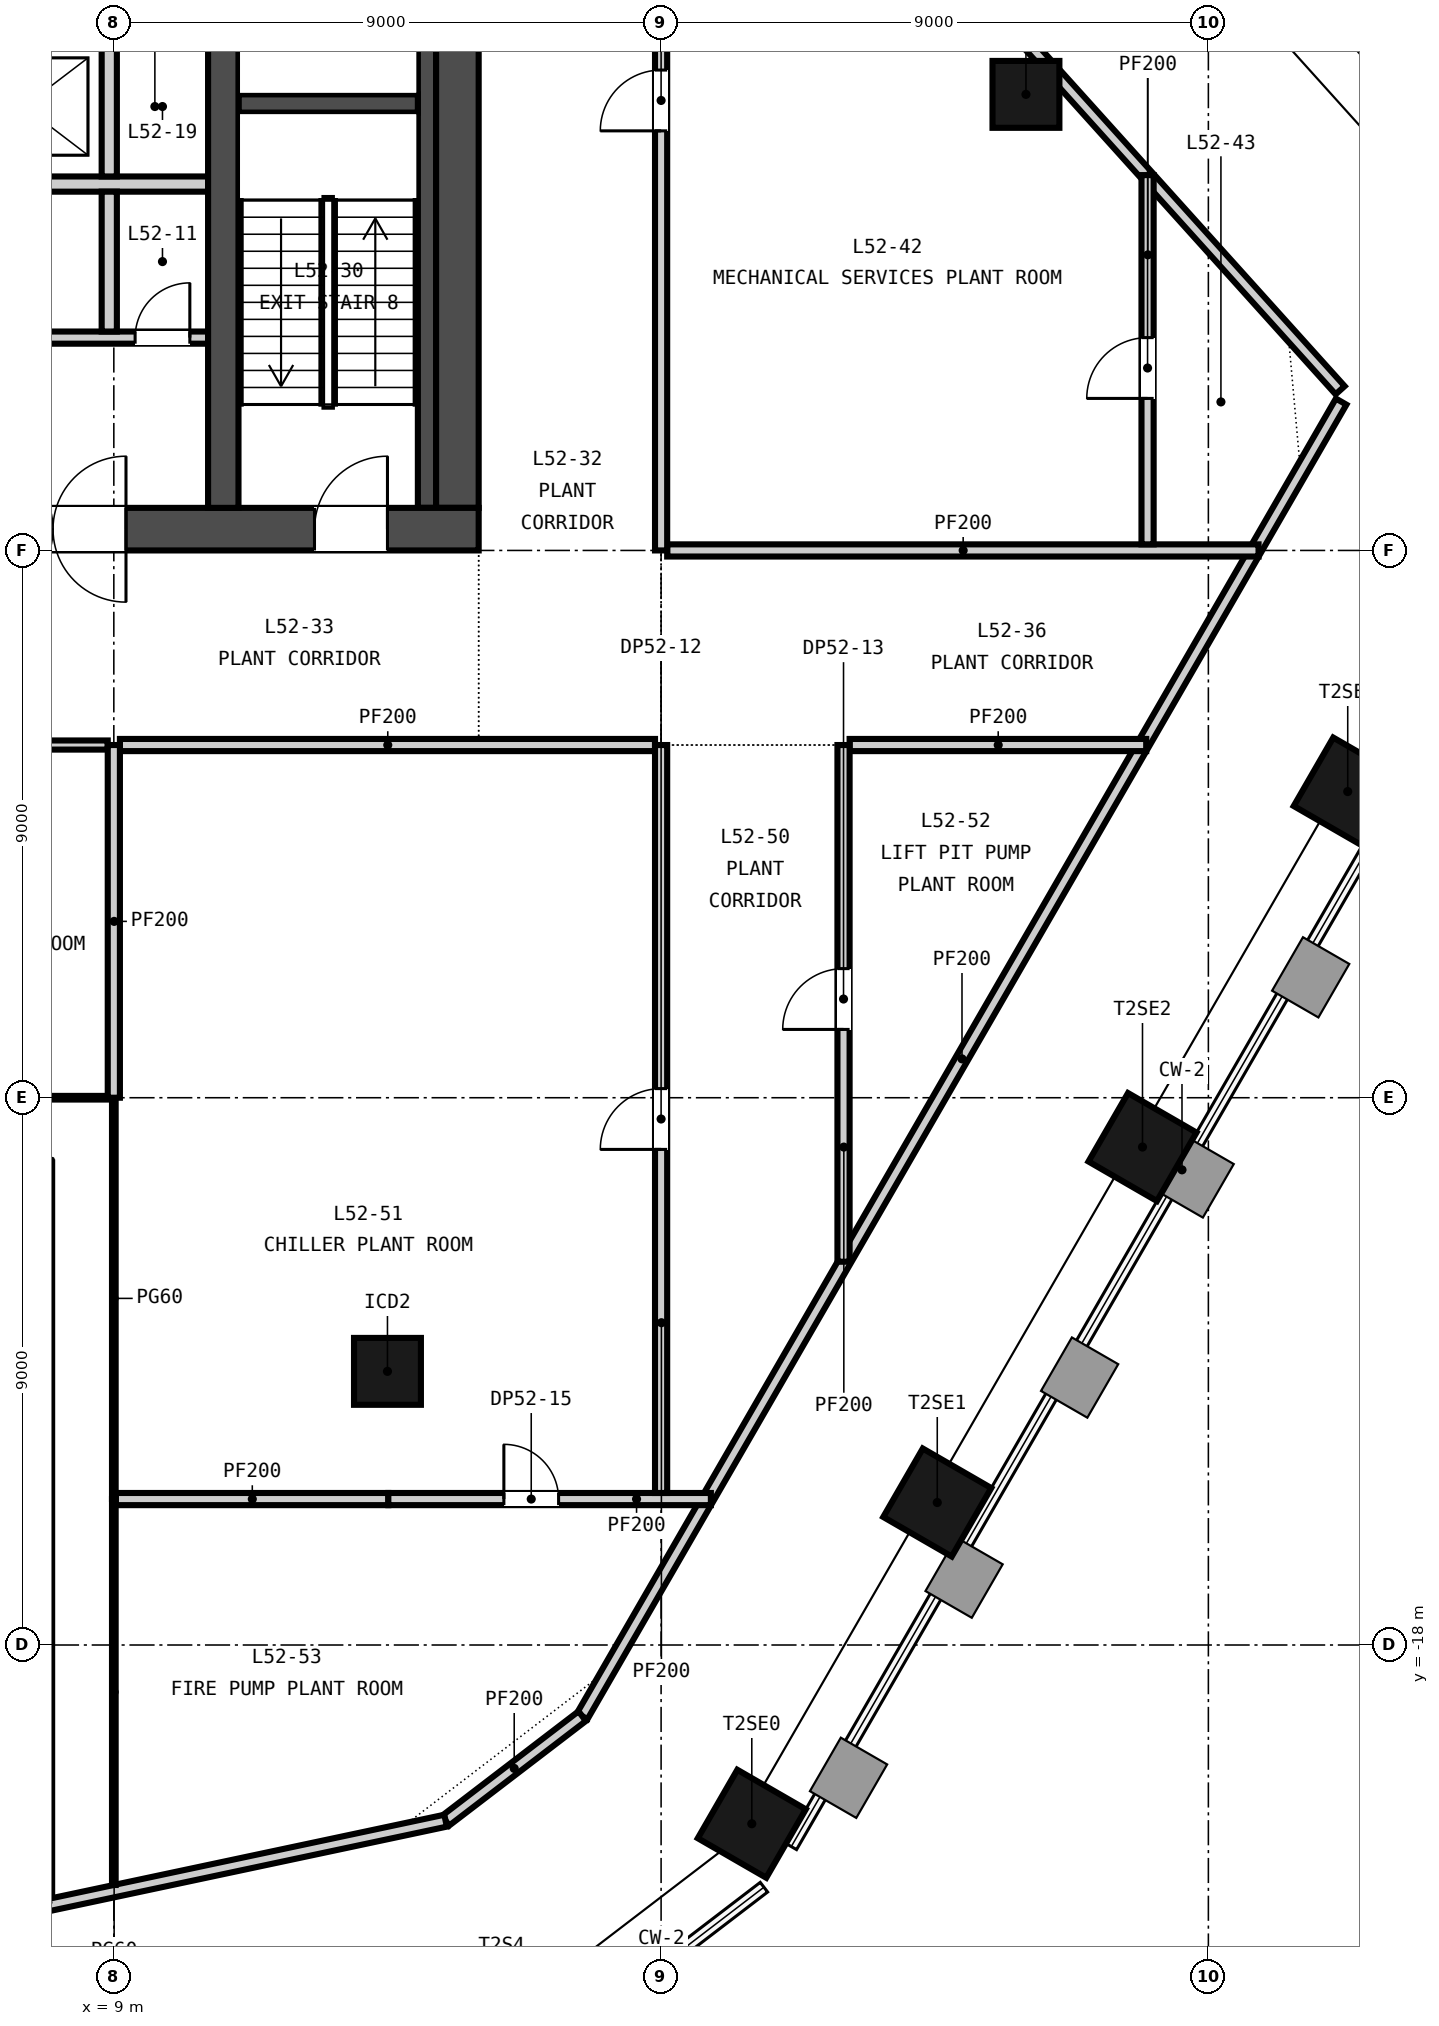
"""IFC4 building model, lengths in metres.
Left out: names, types, materials, properties, quantities, classifications, styles, units other than length and angle.
Written with IfcOpenShell. Run it as: python <this file> out.ifc"""

import sys

from ifc_helpers import new_model, si_unit, direction, frame, frame_2d, origin, origin_2d, place, context, subcontext, project, spatial, rectangle, extrude, element, fill, save


model = new_model("IFC4")
c1 = context("Model", 3, precision=1e-05, world=origin(), true_north=direction((0.0, 1.0)))
c2 = subcontext(c1, "Body", "Model", "MODEL_VIEW")
j1 = project(units=[si_unit("LENGTHUNIT", "METRE"), si_unit("PLANEANGLEUNIT", "RADIAN")], contexts=[c1])
p1 = place(None, origin())
s1 = spatial("IfcSite", under=j1, at=p1, CompositionType="ELEMENT")
p2 = place(p1, origin())
s2 = spatial("IfcBuilding", under=s1, at=p2, CompositionType="ELEMENT")
p3 = place(p2, frame((0.0, 0.0, 207.3)))
s3 = spatial("IfcBuildingStorey", under=s2, at=p3, CompositionType="ELEMENT", Elevation=207.3)
p4 = place(p3, frame((-15.0, 0.35, -0.3), z_axis=(0.0, 0.0, 1.0), x_axis=(1.0, 0.0, 0.0)))
e1 = element("IfcWall", 1, at=p4, inside=s3, PredefinedType="SOLIDWALL", context=c2, shape_type="SweptSolid", body=[
    extrude(rectangle(XDim=30.0, YDim=0.7, at=frame_2d((15.0, 0.0))), origin(), (0.0, 0.0, 1.0), 4.5),
])
p5 = place(p4, frame((5.8, 0.0, 0.3)))
e2 = element("IfcOpeningElement", 2, at=p5, cuts=e1, PredefinedType="OPENING", context=c2, shape_type="SweptSolid", body=[
    extrude(rectangle(XDim=2.4, YDim=2.4, at=frame_2d((1.2, 1.2))), frame((0.0, 0.36, 0.0), z_axis=(0.0, -1.0, 0.0), x_axis=(1.0, 0.0, 0.0)), (0.0, 0.0, 1.0), 0.72),
])
p6 = place(p4, frame((13.8, 0.0, 0.3)))
e3 = element("IfcOpeningElement", 3, at=p6, cuts=e1, PredefinedType="OPENING", context=c2, shape_type="SweptSolid", body=[
    extrude(rectangle(XDim=2.4, YDim=2.4, at=frame_2d((1.2, 1.2))), frame((0.0, 0.36, 0.0), z_axis=(0.0, -1.0, 0.0), x_axis=(1.0, 0.0, 0.0)), (0.0, 0.0, 1.0), 0.72),
])
p7 = place(p4, frame((21.8, 0.0, 0.3)))
e4 = element("IfcOpeningElement", 4, at=p7, cuts=e1, PredefinedType="OPENING", context=c2, shape_type="SweptSolid", body=[
    extrude(rectangle(XDim=2.4, YDim=2.4, at=frame_2d((1.2, 1.2))), frame((0.0, 0.36, 0.0), z_axis=(0.0, -1.0, 0.0), x_axis=(1.0, 0.0, 0.0)), (0.0, 0.0, 1.0), 0.72),
])
p8 = place(p4, frame((1.5, 0.0, 0.3)))
e5 = element("IfcOpeningElement", 5, at=p8, cuts=e1, PredefinedType="OPENING", context=c2, shape_type="SweptSolid", body=[
    extrude(rectangle(XDim=1.2, YDim=2.1, at=frame_2d((0.6, 1.05))), frame((0.0, 0.36, 0.0), z_axis=(0.0, -1.0, 0.0), x_axis=(1.0, 0.0, 0.0)), (0.0, 0.0, 1.0), 0.72),
])
p9 = place(p4, frame((27.3, 0.0, 0.3)))
e6 = element("IfcOpeningElement", 6, at=p9, cuts=e1, PredefinedType="OPENING", context=c2, shape_type="SweptSolid", body=[
    extrude(rectangle(XDim=1.2, YDim=2.1, at=frame_2d((0.6, 1.05))), frame((0.0, 0.36, 0.0), z_axis=(0.0, -1.0, 0.0), x_axis=(1.0, 0.0, 0.0)), (0.0, 0.0, 1.0), 0.72),
])
p10 = place(p3, frame((14.65, 0.7, -0.3), z_axis=(0.0, 0.0, 1.0), x_axis=(0.0, 1.0, 0.0)))
e7 = element("IfcWall", 7, at=p10, inside=s3, PredefinedType="SOLIDWALL", context=c2, shape_type="SweptSolid", body=[
    extrude(rectangle(XDim=13.6, YDim=0.7, at=frame_2d((6.8, 0.0))), origin(), (0.0, 0.0, 1.0), 4.5),
])
p11 = place(p3, frame((10.8, 0.7, -0.3), z_axis=(0.0, 0.0, 1.0), x_axis=(0.0, 1.0, 0.0)))
e8 = element("IfcWall", 8, at=p11, inside=s3, PredefinedType="SOLIDWALL", context=c2, shape_type="SweptSolid", body=[
    extrude(rectangle(XDim=13.6, YDim=0.5, at=frame_2d((6.8, 0.0))), origin(), (0.0, 0.0, 1.0), 4.5),
])
for number, where, z_axis, x_axis in (
    (9, (19.491, -20.94, -0.3), (0.0, 0.0, 1.0), (0.5, 0.866, 0.0)),
    (10, (22.542, -15.657, -0.3), (0.0, 0.0, 1.0), (0.5, 0.866, 0.0)),
    (11, (25.917, -9.811, -0.3), (0.0, 0.0, 1.0), (0.5, 0.866, 0.0)),
    (12, (29.292, -3.965, -0.3), (0.0, 0.0, 1.0), (0.5, 0.866, 0.0)),
):
    element("IfcColumn", number, at=place(p3, frame(where, z_axis=z_axis, x_axis=x_axis)), inside=s3, PredefinedType="COLUMN", context=c2, shape_type="SweptSolid", body=[
        extrude(rectangle(XDim=1.3, YDim=1.3, at=origin_2d()), origin(), (0.0, 0.0, 1.0), 4.5),
    ])
for number, where, z_axis, x_axis in (
    (13, (13.5, -13.5, -0.3), (0.0, 0.0, 1.0), (1.0, 0.0, 0.0)),
    (14, (24.0, 7.5, -0.3), (0.0, 0.0, 1.0), (1.0, 0.0, 0.0)),
):
    element("IfcColumn", number, at=place(p3, frame(where, z_axis=z_axis, x_axis=x_axis)), inside=s3, PredefinedType="COLUMN", context=c2, shape_type="SweptSolid", body=[
        extrude(rectangle(XDim=1.1, YDim=1.1, at=origin_2d()), origin(), (0.0, 0.0, 1.0), 4.5),
    ])
p12 = place(p3, frame((-10.55, 3.5, 0.0), z_axis=(0.0, 0.0, 1.0), x_axis=(1.0, 0.0, 0.0)))
e15 = element("IfcWall", 15, at=p12, inside=s3, PredefinedType="PARTITIONING", context=c2, shape_type="SweptSolid", body=[
    extrude(rectangle(XDim=21.1, YDim=0.2, at=frame_2d((10.55, 0.0))), origin(), (0.0, 0.0, 1.0), 4.2),
])
p13 = place(p12, frame((19.9, 0.0, 0.0)))
e16 = element("IfcOpeningElement", 16, at=p13, cuts=e15, PredefinedType="OPENING", context=c2, shape_type="SweptSolid", body=[
    extrude(rectangle(XDim=0.9, YDim=2.1, at=frame_2d((0.45, 1.05))), frame((0.0, 0.11, 0.0), z_axis=(0.0, -1.0, 0.0), x_axis=(1.0, 0.0, 0.0)), (0.0, 0.0, 1.0), 0.22),
])
p14 = place(p3, frame((-10.55, 6.025, 0.0), z_axis=(0.0, 0.0, 1.0), x_axis=(1.0, 0.0, 0.0)))
e17 = element("IfcWall", 17, at=p14, inside=s3, PredefinedType="PARTITIONING", context=c2, shape_type="SweptSolid", body=[
    extrude(rectangle(XDim=21.1, YDim=0.25, at=frame_2d((10.55, 0.0))), origin(), (0.0, 0.0, 1.0), 4.2),
])
p15 = place(p3, frame((8.925, 3.6, 0.0), z_axis=(0.0, 0.0, 1.0), x_axis=(0.0, 1.0, 0.0)))
e18 = element("IfcWall", 18, at=p15, inside=s3, PredefinedType="PARTITIONING", context=c2, shape_type="SweptSolid", body=[
    extrude(rectangle(XDim=2.3, YDim=0.25, at=frame_2d((1.15, 0.0))), origin(), (0.0, 0.0, 1.0), 4.2),
])
p16 = place(p3, frame((8.925, 6.15, 0.0), z_axis=(0.0, 0.0, 1.0), x_axis=(0.0, 1.0, 0.0)))
e19 = element("IfcWall", 19, at=p16, inside=s3, PredefinedType="PARTITIONING", context=c2, shape_type="SweptSolid", body=[
    extrude(rectangle(XDim=2.3, YDim=0.25, at=frame_2d((1.15, 0.0))), origin(), (0.0, 0.0, 1.0), 4.2),
])
p17 = place(p3, frame((11.05, 7.35, 0.0), z_axis=(0.0, 0.0, 1.0), x_axis=(1.0, 0.0, 0.0)))
e20 = element("IfcWall", 20, at=p17, inside=s3, PredefinedType="SOLIDWALL", context=c2, shape_type="SweptSolid", body=[
    extrude(rectangle(XDim=2.95, YDim=0.3, at=frame_2d((1.475, 0.0))), origin(), (0.0, 0.0, 1.0), 4.2),
])
p18 = place(p3, frame((14.15, 0.7, 0.0), z_axis=(0.0, 0.0, 1.0), x_axis=(0.0, 1.0, 0.0)))
e21 = element("IfcWall", 21, at=p18, inside=s3, PredefinedType="SOLIDWALL", context=c2, shape_type="SweptSolid", body=[
    extrude(rectangle(XDim=13.6, YDim=0.3, at=frame_2d((6.8, 0.0))), origin(), (0.0, 0.0, 1.0), 4.2),
])
p19 = place(p3, frame((9.03, -15.6, 0.0), z_axis=(0.0, 0.0, 1.0), x_axis=(1.0, 0.0, 0.0)))
e22 = element("IfcWall", 22, at=p19, inside=s3, PredefinedType="PARTITIONING", context=c2, shape_type="SweptSolid", body=[
    extrude(rectangle(XDim=4.484, YDim=0.2, at=frame_2d((2.242, 0.0))), origin(), (0.0, 0.0, 1.0), 4.2),
])
p20 = place(p3, frame((13.514, -15.6, 0.0), z_axis=(0.0, 0.0, 1.0), x_axis=(1.0, 0.0, 0.0)))
e23 = element("IfcWall", 23, at=p20, inside=s3, PredefinedType="PARTITIONING", context=c2, shape_type="SweptSolid", body=[
    extrude(rectangle(XDim=5.304, YDim=0.2, at=frame_2d((2.652, 0.0))), origin(), (0.0, 0.0, 1.0), 3.749),
])
p21 = place(p20, frame((1.9, 0.0, 0.0)))
e24 = element("IfcOpeningElement", 24, at=p21, cuts=e23, PredefinedType="OPENING", context=c2, shape_type="SweptSolid", body=[
    extrude(rectangle(XDim=0.9, YDim=2.1, at=frame_2d((0.45, 1.05))), frame((0.0, 0.11, 0.0), z_axis=(0.0, -1.0, 0.0), x_axis=(1.0, 0.0, 0.0)), (0.0, 0.0, 1.0), 0.22),
])
p22 = place(p3, frame((-0.9, -9.0, 0.0), z_axis=(0.0, 0.0, 1.0), x_axis=(1.0, 0.0, 0.0)))
e25 = element("IfcWall", 25, at=p22, inside=s3, PredefinedType="PARTITIONING", context=c2, shape_type="SweptSolid", body=[
    extrude(rectangle(XDim=9.8, YDim=0.06, at=frame_2d((4.9, 0.0))), origin(), (0.0, 0.0, 1.0), 4.2),
])
p23 = place(p3, frame((-0.9, -3.2, 0.0), z_axis=(0.0, 0.0, 1.0), x_axis=(1.0, 0.0, 0.0)))
e26 = element("IfcWall", 26, at=p23, inside=s3, PredefinedType="PARTITIONING", context=c2, shape_type="SweptSolid", body=[
    extrude(rectangle(XDim=9.8, YDim=0.15, at=frame_2d((4.9, 0.0))), origin(), (0.0, 0.0, 1.0), 4.2),
])
p24 = place(p23, frame((4.4, 0.0, 0.0)))
e27 = element("IfcOpeningElement", 27, at=p24, cuts=e26, PredefinedType="OPENING", context=c2, shape_type="SweptSolid", body=[
    extrude(rectangle(XDim=1.0, YDim=2.1, at=frame_2d((0.5, 1.05))), frame((0.0, 0.085, 0.0), z_axis=(0.0, -1.0, 0.0), x_axis=(1.0, 0.0, 0.0)), (0.0, 0.0, 1.0), 0.17),
])
p25 = place(p3, frame((9.1, -3.2, 0.0), z_axis=(0.0, 0.0, 1.0), x_axis=(1.0, 0.0, 0.0)))
e28 = element("IfcWall", 28, at=p25, inside=s3, PredefinedType="PARTITIONING", context=c2, shape_type="SweptSolid", body=[
    extrude(rectangle(XDim=8.8, YDim=0.2, at=frame_2d((4.4, 0.0))), origin(), (0.0, 0.0, 1.0), 4.2),
])
p26 = place(p3, frame((21.1, -3.2, 0.0), z_axis=(0.0, 0.0, 1.0), x_axis=(1.0, 0.0, 0.0)))
e29 = element("IfcWall", 29, at=p26, inside=s3, PredefinedType="PARTITIONING", context=c2, shape_type="SweptSolid", body=[
    extrude(rectangle(XDim=4.877, YDim=0.2, at=frame_2d((2.439, 0.0))), origin(), (0.0, 0.0, 1.0), 4.2),
])
p27 = place(p3, frame((18.1, 0.0, 0.0), z_axis=(0.0, 0.0, 1.0), x_axis=(1.0, 0.0, 0.0)))
e30 = element("IfcWall", 30, at=p27, inside=s3, PredefinedType="PARTITIONING", context=c2, shape_type="SweptSolid", body=[
    extrude(rectangle(XDim=9.725, YDim=0.2, at=frame_2d((4.863, 0.0))), origin(), (0.0, 0.0, 1.0), 4.2),
])
p28 = place(p3, frame((9.0, -21.947, 0.0), z_axis=(0.0, 0.0, 1.0), x_axis=(0.0, 1.0, 0.0)))
e31 = element("IfcWall", 31, at=p28, inside=s3, PredefinedType="PARTITIONING", context=c2, shape_type="SweptSolid", body=[
    extrude(rectangle(XDim=6.345, YDim=0.06, at=frame_2d((3.173, 0.0))), origin(), (0.0, 0.0, 1.0), 4.2),
])
p29 = place(p3, frame((9.0, -15.599, 0.0), z_axis=(0.0, 0.0, 1.0), x_axis=(0.0, 1.0, 0.0)))
e32 = element("IfcWall", 32, at=p29, inside=s3, PredefinedType="PARTITIONING", context=c2, shape_type="SweptSolid", body=[
    extrude(rectangle(XDim=6.598, YDim=0.06, at=frame_2d((3.299, 0.0))), origin(), (0.0, 0.0, 1.0), 4.2),
])
p30 = place(p3, frame((9.0, -9.0, 0.0), z_axis=(0.0, 0.0, 1.0), x_axis=(0.0, 1.0, 0.0)))
e33 = element("IfcWall", 33, at=p30, inside=s3, PredefinedType="PARTITIONING", context=c2, shape_type="SweptSolid", body=[
    extrude(rectangle(XDim=5.8, YDim=0.2, at=frame_2d((2.9, 0.0))), origin(), (0.0, 0.0, 1.0), 4.2),
])
p31 = place(p3, frame((18.0, -15.5, 0.0), z_axis=(0.0, 0.0, 1.0), x_axis=(0.0, 1.0, 0.0)))
e34 = element("IfcWall", 34, at=p31, inside=s3, PredefinedType="PARTITIONING", context=c2, shape_type="SweptSolid", body=[
    extrude(rectangle(XDim=12.3, YDim=0.2, at=frame_2d((6.15, 0.0))), origin(), (0.0, 0.0, 1.0), 4.2),
])
p32 = place(p31, frame((5.65, 0.0, 0.0)))
e35 = element("IfcOpeningElement", 35, at=p32, cuts=e34, PredefinedType="OPENING", context=c2, shape_type="SweptSolid", body=[
    extrude(rectangle(XDim=1.0, YDim=2.1, at=frame_2d((0.5, 1.05))), frame((0.0, 0.11, 0.0), z_axis=(0.0, -1.0, 0.0), x_axis=(1.0, 0.0, 0.0)), (0.0, 0.0, 1.0), 0.22),
])
p33 = place(p3, frame((18.0, 0.0, 0.0), z_axis=(0.0, 0.0, 1.0), x_axis=(0.0, 1.0, 0.0)))
e36 = element("IfcWall", 36, at=p33, inside=s3, PredefinedType="PARTITIONING", context=c2, shape_type="SweptSolid", body=[
    extrude(rectangle(XDim=15.057, YDim=0.2, at=frame_2d((7.529, 0.0))), origin(), (0.0, 0.0, 1.0), 4.2),
])
p34 = place(p33, frame((6.9, 0.0, 0.0)))
e37 = element("IfcOpeningElement", 37, at=p34, cuts=e36, PredefinedType="OPENING", context=c2, shape_type="SweptSolid", body=[
    extrude(rectangle(XDim=1.0, YDim=2.1, at=frame_2d((0.5, 1.05))), frame((0.0, 0.11, 0.0), z_axis=(0.0, -1.0, 0.0), x_axis=(1.0, 0.0, 0.0)), (0.0, 0.0, 1.0), 0.22),
])
p35 = place(p3, frame((21.0, -11.697, 0.0), z_axis=(0.0, 0.0, 1.0), x_axis=(0.0, 1.0, 0.0)))
e38 = element("IfcWall", 38, at=p35, inside=s3, PredefinedType="PARTITIONING", context=c2, shape_type="SweptSolid", body=[
    extrude(rectangle(XDim=8.497, YDim=0.2, at=frame_2d((4.249, 0.0))), origin(), (0.0, 0.0, 1.0), 4.2),
])
p36 = place(p35, frame((3.82, 0.0, 0.0)))
e39 = element("IfcOpeningElement", 39, at=p36, cuts=e38, PredefinedType="OPENING", context=c2, shape_type="SweptSolid", body=[
    extrude(rectangle(XDim=1.0, YDim=2.1, at=frame_2d((0.5, 1.05))), frame((0.0, 0.11, 0.0), z_axis=(0.0, -1.0, 0.0), x_axis=(1.0, 0.0, 0.0)), (0.0, 0.0, 1.0), 0.22),
])
p37 = place(p3, frame((26.0, 0.1, 0.0), z_axis=(0.0, 0.0, 1.0), x_axis=(0.0, 1.0, 0.0)))
e40 = element("IfcWall", 40, at=p37, inside=s3, PredefinedType="PARTITIONING", context=c2, shape_type="SweptSolid", body=[
    extrude(rectangle(XDim=6.072, YDim=0.2, at=frame_2d((3.036, 0.0))), origin(), (0.0, 0.0, 1.0), 4.2),
])
p38 = place(p37, frame((2.4, 0.0, 0.0)))
e41 = element("IfcOpeningElement", 41, at=p38, cuts=e40, PredefinedType="OPENING", context=c2, shape_type="SweptSolid", body=[
    extrude(rectangle(XDim=1.0, YDim=2.1, at=frame_2d((0.5, 1.05))), frame((0.0, 0.11, 0.0), z_axis=(0.0, -1.0, 0.0), x_axis=(1.0, 0.0, 0.0)), (0.0, 0.0, 1.0), 0.22),
])
p39 = place(p3, frame((10.863, 22.964, 0.0), z_axis=(0.0, 0.0, 1.0), x_axis=(0.669131375447, -0.743144132987, 0.0)))
e42 = element("IfcWall", 42, at=p39, inside=s3, PredefinedType="PARTITIONING", context=c2, shape_type="SweptSolid", body=[
    extrude(rectangle(XDim=27.355, YDim=0.2, at=frame_2d((13.678, 0.0))), origin(), (0.0, 0.0, 1.0), 4.2),
])
p40 = place(p3, frame((29.184, 2.448, 0.0), z_axis=(0.0, 0.0, 1.0), x_axis=(-0.499996482004, -0.866027434891, 0.0)))
e43 = element("IfcWall", 43, at=p40, inside=s3, PredefinedType="PARTITIONING", context=c2, shape_type="SweptSolid", body=[
    extrude(rectangle(XDim=24.962, YDim=0.2, at=frame_2d((12.481, 0.0))), origin(), (0.0, 0.0, 1.0), 4.2),
])
p41 = place(p3, frame((16.703, -19.17, 0.0), z_axis=(0.0, 0.0, 1.0), x_axis=(-0.794164311505, -0.607703090605, 0.0)))
e44 = element("IfcWall", 44, at=p41, inside=s3, PredefinedType="PARTITIONING", context=c2, shape_type="SweptSolid", body=[
    extrude(rectangle(XDim=2.83, YDim=0.2, at=frame_2d((1.415, 0.0))), origin(), (0.0, 0.0, 1.0), 4.2),
])
p42 = place(p3, frame((14.456, -20.889, 0.0), z_axis=(0.0, 0.0, 1.0), x_axis=(-0.978147962207, -0.207909990215, 0.0)))
e45 = element("IfcWall", 45, at=p42, inside=s3, PredefinedType="PARTITIONING", context=c2, shape_type="SweptSolid", body=[
    extrude(rectangle(XDim=27.355, YDim=0.2, at=frame_2d((13.678, 0.0))), origin(), (0.0, 0.0, 1.0), 4.2),
])
p43 = place(p13, origin())
e46 = element("IfcDoor", 46, at=p43, inside=s3, OperationType="SINGLE_SWING_RIGHT", PredefinedType="DOOR", context=c2, shape_type="SweptSolid", body=[
    extrude(rectangle(XDim=0.9, YDim=2.1, at=frame_2d((0.45, 1.05))), frame((0.0, 0.025, 0.0), z_axis=(0.0, -1.0, 0.0), x_axis=(1.0, 0.0, 0.0)), (0.0, 0.0, 1.0), 0.05),
])
fill(e16, e46)
p44 = place(p7, origin())
e47 = element("IfcDoor", 47, at=p44, inside=s3, OperationType="DOUBLE_DOOR_DOUBLE_SWING", PredefinedType="DOOR", context=c2, shape_type="SweptSolid", body=[
    extrude(rectangle(XDim=2.4, YDim=2.4, at=frame_2d((1.2, 1.2))), frame((0.0, 0.025, 0.0), z_axis=(0.0, -1.0, 0.0), x_axis=(1.0, 0.0, 0.0)), (0.0, 0.0, 1.0), 0.05),
])
fill(e4, e47)
p45 = place(p9, origin())
e48 = element("IfcDoor", 48, at=p45, inside=s3, OperationType="SINGLE_SWING_RIGHT", PredefinedType="DOOR", context=c2, shape_type="SweptSolid", body=[
    extrude(rectangle(XDim=1.2, YDim=2.1, at=frame_2d((0.6, 1.05))), frame((0.0, 0.025, 0.0), z_axis=(0.0, -1.0, 0.0), x_axis=(1.0, 0.0, 0.0)), (0.0, 0.0, 1.0), 0.05),
])
fill(e6, e48)
p46 = place(p34, origin())
e49 = element("IfcDoor", 49, at=p46, inside=s3, OperationType="SINGLE_SWING_LEFT", PredefinedType="DOOR", context=c2, shape_type="SweptSolid", body=[
    extrude(rectangle(XDim=1.0, YDim=2.1, at=frame_2d((0.5, 1.05))), frame((0.0, 0.025, 0.0), z_axis=(0.0, -1.0, 0.0), x_axis=(1.0, 0.0, 0.0)), (0.0, 0.0, 1.0), 0.05),
])
fill(e37, e49)
p47 = place(p38, origin())
e50 = element("IfcDoor", 50, at=p47, inside=s3, OperationType="SINGLE_SWING_LEFT", PredefinedType="DOOR", context=c2, shape_type="SweptSolid", body=[
    extrude(rectangle(XDim=1.0, YDim=2.1, at=frame_2d((0.5, 1.05))), frame((0.0, 0.025, 0.0), z_axis=(0.0, -1.0, 0.0), x_axis=(1.0, 0.0, 0.0)), (0.0, 0.0, 1.0), 0.05),
])
fill(e41, e50)
p48 = place(p32, origin())
e51 = element("IfcDoor", 51, at=p48, inside=s3, OperationType="SINGLE_SWING_LEFT", PredefinedType="DOOR", context=c2, shape_type="SweptSolid", body=[
    extrude(rectangle(XDim=1.0, YDim=2.1, at=frame_2d((0.5, 1.05))), frame((0.0, 0.025, 0.0), z_axis=(0.0, -1.0, 0.0), x_axis=(1.0, 0.0, 0.0)), (0.0, 0.0, 1.0), 0.05),
])
fill(e35, e51)
p49 = place(p36, origin())
e52 = element("IfcDoor", 52, at=p49, inside=s3, OperationType="SINGLE_SWING_LEFT", PredefinedType="DOOR", context=c2, shape_type="SweptSolid", body=[
    extrude(rectangle(XDim=1.0, YDim=2.1, at=frame_2d((0.5, 1.05))), frame((0.0, 0.025, 0.0), z_axis=(0.0, -1.0, 0.0), x_axis=(1.0, 0.0, 0.0)), (0.0, 0.0, 1.0), 0.05),
])
fill(e39, e52)
p50 = place(p21, origin())
e53 = element("IfcDoor", 53, at=p50, inside=s3, OperationType="SINGLE_SWING_LEFT", PredefinedType="DOOR", context=c2, shape_type="SweptSolid", body=[
    extrude(rectangle(XDim=0.9, YDim=2.1, at=frame_2d((0.45, 1.05))), frame((0.0, 0.025, 0.0), z_axis=(0.0, -1.0, 0.0), x_axis=(1.0, 0.0, 0.0)), (0.0, 0.0, 1.0), 0.05),
])
fill(e24, e53)
save(model, sys.argv[1])
